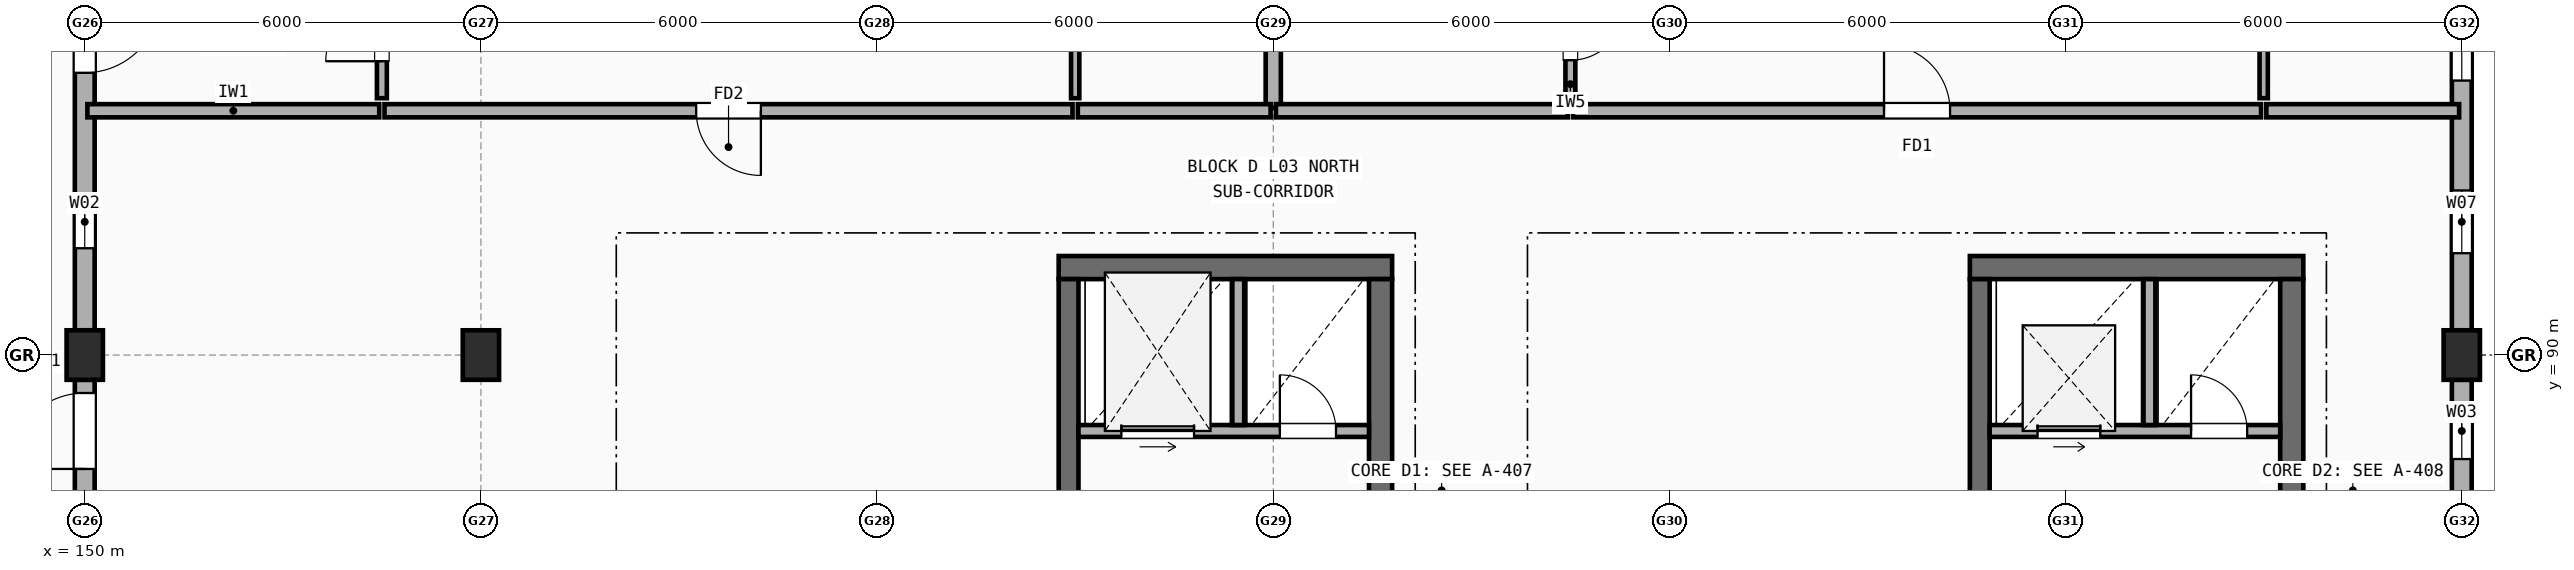
"""IFC4 building model, lengths in metres.
Left out: names, types, materials, properties, quantities, classifications, styles, units other than length and angle.
Written with IfcOpenShell. Run it as: python <this file> out.ifc"""

import sys

from ifc_helpers import new_model, si_unit, direction, frame, frame_2d, origin, origin_2d, place, context, subcontext, project, spatial, rectangle, extrude, element, fill, save


model = new_model("IFC4")
c1 = context("Model", 3, precision=1e-05, world=origin(), true_north=direction((0.0, 1.0)))
c2 = subcontext(c1, "Body", "Model", "MODEL_VIEW")
j1 = project(units=[si_unit("LENGTHUNIT", "METRE"), si_unit("PLANEANGLEUNIT", "RADIAN")], contexts=[c1])
p1 = place(None, origin())
s1 = spatial("IfcSite", under=j1, at=p1, CompositionType="ELEMENT")
p2 = place(p1, origin())
s2 = spatial("IfcBuilding", under=s1, at=p2, CompositionType="ELEMENT")
p3 = place(p2, frame((0.0, 0.0, 10.9)))
s3 = spatial("IfcBuildingStorey", under=s2, at=p3, CompositionType="ELEMENT", Elevation=10.9)
for number, where, z_axis, x_axis in (
    (1, (150.0, 90.0, 0.0), (0.0, 0.0, 1.0), (1.0, 0.0, 0.0)),
    (2, (156.0, 90.0, 0.0), (0.0, 0.0, 1.0), (1.0, 0.0, 0.0)),
    (3, (186.0, 90.0, 0.0), (0.0, 0.0, 1.0), (1.0, 0.0, 0.0)),
):
    element("IfcColumn", number, at=place(p3, frame(where, z_axis=z_axis, x_axis=x_axis)), inside=s3, PredefinedType="COLUMN", context=c2, shape_type="SweptSolid", body=[
        extrude(rectangle(XDim=0.55, YDim=0.75, at=origin_2d()), origin(), (0.0, 0.0, 1.0), 2.96),
    ])
p4 = place(p3, frame((186.0, 84.375, 0.0), z_axis=(0.0, 0.0, 1.0), x_axis=(0.0, 1.0, 0.0)))
e4 = element("IfcWall", 4, at=p4, inside=s3, PredefinedType="STANDARD", context=c2, shape_type="SweptSolid", body=[
    extrude(rectangle(XDim=5.25, YDim=0.3, at=frame_2d((2.625, 0.0))), origin(), (0.0, 0.0, 1.0), 2.442),
])
p5 = place(p4, frame((0.35, 0.0, 0.9)))
e5 = element("IfcOpeningElement", 5, at=p5, cuts=e4, PredefinedType="OPENING", context=c2, shape_type="SweptSolid", body=[
    extrude(rectangle(XDim=0.85, YDim=1.25, at=frame_2d((0.425, 0.625))), frame((0.0, 0.16, 0.0), z_axis=(0.0, -1.0, 0.0), x_axis=(1.0, 0.0, 0.0)), (0.0, 0.0, 1.0), 0.32),
])
p6 = place(p4, frame((4.05, 0.0, 0.9)))
e6 = element("IfcOpeningElement", 6, at=p6, cuts=e4, PredefinedType="OPENING", context=c2, shape_type="SweptSolid", body=[
    extrude(rectangle(XDim=0.85, YDim=1.25, at=frame_2d((0.425, 0.625))), frame((0.0, 0.16, 0.0), z_axis=(0.0, -1.0, 0.0), x_axis=(1.0, 0.0, 0.0)), (0.0, 0.0, 1.0), 0.32),
])
p7 = place(p3, frame((186.0, 90.375, 0.0), z_axis=(0.0, 0.0, 1.0), x_axis=(0.0, 1.0, 0.0)))
e7 = element("IfcWall", 7, at=p7, inside=s3, PredefinedType="STANDARD", context=c2, shape_type="SweptSolid", body=[
    extrude(rectangle(XDim=5.25, YDim=0.3, at=frame_2d((2.625, 0.0))), origin(), (0.0, 0.0, 1.0), 2.442),
])
p8 = place(p7, frame((1.167, 0.0, 0.9)))
e8 = element("IfcOpeningElement", 8, at=p8, cuts=e7, PredefinedType="OPENING", context=c2, shape_type="SweptSolid", body=[
    extrude(rectangle(XDim=0.95, YDim=1.35, at=frame_2d((0.475, 0.675))), frame((0.0, 0.16, 0.0), z_axis=(0.0, -1.0, 0.0), x_axis=(1.0, 0.0, 0.0)), (0.0, 0.0, 1.0), 0.32),
])
p9 = place(p7, frame((3.782, 0.0, 0.9)))
e9 = element("IfcOpeningElement", 9, at=p9, cuts=e7, PredefinedType="OPENING", context=c2, shape_type="SweptSolid", body=[
    extrude(rectangle(XDim=1.05, YDim=1.35, at=frame_2d((0.525, 0.675))), frame((0.0, 0.16, 0.0), z_axis=(0.0, -1.0, 0.0), x_axis=(1.0, 0.0, 0.0)), (0.0, 0.0, 1.0), 0.32),
])
p10 = place(p3, frame((150.0, 95.625, 0.0), z_axis=(0.0, 0.0, 1.0), x_axis=(0.0, -1.0, 0.0)))
e10 = element("IfcWall", 10, at=p10, inside=s3, PredefinedType="STANDARD", context=c2, shape_type="SweptSolid", body=[
    extrude(rectangle(XDim=5.25, YDim=0.3, at=frame_2d((2.625, 0.0))), origin(), (0.0, 0.0, 1.0), 2.442),
])
p11 = place(p10, frame((0.2, 0.0, 0.0)))
e11 = element("IfcOpeningElement", 11, at=p11, cuts=e10, PredefinedType="OPENING", context=c2, shape_type="SweptSolid", body=[
    extrude(rectangle(XDim=1.15, YDim=2.15, at=frame_2d((0.575, 1.075))), frame((0.0, 0.16, 0.0), z_axis=(0.0, -1.0, 0.0), x_axis=(1.0, 0.0, 0.0)), (0.0, 0.0, 1.0), 0.32),
])
p12 = place(p10, frame((3.208, 0.0, 0.9)))
e12 = element("IfcOpeningElement", 12, at=p12, cuts=e10, PredefinedType="OPENING", context=c2, shape_type="SweptSolid", body=[
    extrude(rectangle(XDim=0.8, YDim=1.2, at=frame_2d((0.4, 0.6))), frame((0.0, 0.16, 0.0), z_axis=(0.0, -1.0, 0.0), x_axis=(1.0, 0.0, 0.0)), (0.0, 0.0, 1.0), 0.32),
])
p13 = place(p3, frame((150.0, 89.625, 0.0), z_axis=(0.0, 0.0, 1.0), x_axis=(0.0, -1.0, 0.0)))
e13 = element("IfcWall", 13, at=p13, inside=s3, PredefinedType="STANDARD", context=c2, shape_type="SweptSolid", body=[
    extrude(rectangle(XDim=5.25, YDim=0.3, at=frame_2d((2.625, 0.0))), origin(), (0.0, 0.0, 1.0), 2.442),
])
p14 = place(p13, frame((0.2, 0.0, 0.0)))
e14 = element("IfcOpeningElement", 14, at=p14, cuts=e13, PredefinedType="OPENING", context=c2, shape_type="SweptSolid", body=[
    extrude(rectangle(XDim=1.15, YDim=2.15, at=frame_2d((0.575, 1.075))), frame((0.0, 0.16, 0.0), z_axis=(0.0, -1.0, 0.0), x_axis=(1.0, 0.0, 0.0)), (0.0, 0.0, 1.0), 0.32),
])
p15 = place(p3, frame((169.8, 91.325, 0.0), z_axis=(0.0, 0.0, 1.0), x_axis=(-1.0, 0.0, 0.0)))
e15 = element("IfcWall", 15, at=p15, inside=s3, PredefinedType="SHEAR", context=c2, shape_type="SweptSolid", body=[
    extrude(rectangle(XDim=5.05, YDim=0.35, at=frame_2d((2.525, 0.0))), origin(), (0.0, 0.0, 1.0), 2.96),
])
p16 = place(p3, frame((169.625, 84.75, 0.0), z_axis=(0.0, 0.0, 1.0), x_axis=(0.0, 1.0, 0.0)))
e16 = element("IfcWall", 16, at=p16, inside=s3, PredefinedType="SHEAR", context=c2, shape_type="SweptSolid", body=[
    extrude(rectangle(XDim=6.4, YDim=0.35, at=frame_2d((3.2, 0.0))), origin(), (0.0, 0.0, 1.0), 2.96),
])
p17 = place(p3, frame((164.9, 87.8, 0.0), z_axis=(0.0, 0.0, 1.0), x_axis=(0.0, 1.0, 0.0)))
e17 = element("IfcWall", 17, at=p17, inside=s3, PredefinedType="SHEAR", context=c2, shape_type="SweptSolid", body=[
    extrude(rectangle(XDim=3.35, YDim=0.3, at=frame_2d((1.675, 0.0))), origin(), (0.0, 0.0, 1.0), 2.96),
])
p18 = place(p3, frame((165.05, 88.85, 0.0), z_axis=(0.0, 0.0, 1.0), x_axis=(1.0, 0.0, 0.0)))
e18 = element("IfcWall", 18, at=p18, inside=s3, PredefinedType="SOLIDWALL", context=c2, shape_type="SweptSolid", body=[
    extrude(rectangle(XDim=4.4, YDim=0.18, at=frame_2d((2.2, 0.0))), origin(), (0.0, 0.0, 1.0), 2.96),
])
p19 = place(p18, frame((0.65, 0.0, 0.0)))
e19 = element("IfcOpeningElement", 19, at=p19, cuts=e18, PredefinedType="OPENING", context=c2, shape_type="SweptSolid", body=[
    extrude(rectangle(XDim=1.1, YDim=2.15, at=frame_2d((0.55, 1.075))), frame((0.0, 0.1, 0.0), z_axis=(0.0, -1.0, 0.0), x_axis=(1.0, 0.0, 0.0)), (0.0, 0.0, 1.0), 0.2),
])
p20 = place(p18, frame((3.05, 0.0, 0.0)))
e20 = element("IfcOpeningElement", 20, at=p20, cuts=e18, PredefinedType="OPENING", context=c2, shape_type="SweptSolid", body=[
    extrude(rectangle(XDim=0.85, YDim=2.1, at=frame_2d((0.425, 1.05))), frame((0.0, 0.1, 0.0), z_axis=(0.0, -1.0, 0.0), x_axis=(1.0, 0.0, 0.0)), (0.0, 0.0, 1.0), 0.2),
])
p21 = place(p3, frame((167.47, 88.94, 0.0), z_axis=(0.0, 0.0, 1.0), x_axis=(0.0, 1.0, 0.0)))
e21 = element("IfcWall", 21, at=p21, inside=s3, PredefinedType="SOLIDWALL", context=c2, shape_type="SweptSolid", body=[
    extrude(rectangle(XDim=2.21, YDim=0.18, at=frame_2d((1.105, 0.0))), origin(), (0.0, 0.0, 1.0), 2.96),
])
p22 = place(p3, frame((183.6, 91.325, 0.0), z_axis=(0.0, 0.0, 1.0), x_axis=(-1.0, 0.0, 0.0)))
e22 = element("IfcWall", 22, at=p22, inside=s3, PredefinedType="SHEAR", context=c2, shape_type="SweptSolid", body=[
    extrude(rectangle(XDim=5.05, YDim=0.35, at=frame_2d((2.525, 0.0))), origin(), (0.0, 0.0, 1.0), 2.96),
])
p23 = place(p3, frame((183.425, 84.75, 0.0), z_axis=(0.0, 0.0, 1.0), x_axis=(0.0, 1.0, 0.0)))
e23 = element("IfcWall", 23, at=p23, inside=s3, PredefinedType="SHEAR", context=c2, shape_type="SweptSolid", body=[
    extrude(rectangle(XDim=6.4, YDim=0.35, at=frame_2d((3.2, 0.0))), origin(), (0.0, 0.0, 1.0), 2.96),
])
p24 = place(p3, frame((178.7, 87.7, 0.0), z_axis=(0.0, 0.0, 1.0), x_axis=(0.0, 1.0, 0.0)))
e24 = element("IfcWall", 24, at=p24, inside=s3, PredefinedType="SHEAR", context=c2, shape_type="SweptSolid", body=[
    extrude(rectangle(XDim=3.45, YDim=0.3, at=frame_2d((1.725, 0.0))), origin(), (0.0, 0.0, 1.0), 2.96),
])
p25 = place(p3, frame((178.85, 88.85, 0.0), z_axis=(0.0, 0.0, 1.0), x_axis=(1.0, 0.0, 0.0)))
e25 = element("IfcWall", 25, at=p25, inside=s3, PredefinedType="SOLIDWALL", context=c2, shape_type="SweptSolid", body=[
    extrude(rectangle(XDim=4.4, YDim=0.18, at=frame_2d((2.2, 0.0))), origin(), (0.0, 0.0, 1.0), 2.96),
])
p26 = place(p25, frame((0.725, 0.0, 0.0)))
e26 = element("IfcOpeningElement", 26, at=p26, cuts=e25, PredefinedType="OPENING", context=c2, shape_type="SweptSolid", body=[
    extrude(rectangle(XDim=0.95, YDim=2.15, at=frame_2d((0.475, 1.075))), frame((0.0, 0.1, 0.0), z_axis=(0.0, -1.0, 0.0), x_axis=(1.0, 0.0, 0.0)), (0.0, 0.0, 1.0), 0.2),
])
p27 = place(p25, frame((3.05, 0.0, 0.0)))
e27 = element("IfcOpeningElement", 27, at=p27, cuts=e25, PredefinedType="OPENING", context=c2, shape_type="SweptSolid", body=[
    extrude(rectangle(XDim=0.85, YDim=2.1, at=frame_2d((0.425, 1.05))), frame((0.0, 0.1, 0.0), z_axis=(0.0, -1.0, 0.0), x_axis=(1.0, 0.0, 0.0)), (0.0, 0.0, 1.0), 0.2),
])
p28 = place(p3, frame((181.27, 88.94, 0.0), z_axis=(0.0, 0.0, 1.0), x_axis=(0.0, 1.0, 0.0)))
e28 = element("IfcWall", 28, at=p28, inside=s3, PredefinedType="SOLIDWALL", context=c2, shape_type="SweptSolid", body=[
    extrude(rectangle(XDim=2.21, YDim=0.18, at=frame_2d((1.105, 0.0))), origin(), (0.0, 0.0, 1.0), 2.96),
])
p29 = place(p3, frame((168.0, 93.74, 0.0), z_axis=(0.0, 0.0, 1.0), x_axis=(0.0, 1.0, 0.0)))
e29 = element("IfcWall", 29, at=p29, inside=s3, PredefinedType="SOLIDWALL", context=c2, shape_type="SweptSolid", body=[
    extrude(rectangle(XDim=13.87, YDim=0.23, at=frame_2d((6.935, 0.0))), origin(), (0.0, 0.0, 1.0), 2.458),
])
p30 = place(p3, frame((150.04, 93.7, 0.0), z_axis=(0.0, 0.0, 1.0), x_axis=(1.0, 0.0, 0.0)))
e30 = element("IfcWall", 30, at=p30, inside=s3, PredefinedType="SOLIDWALL", context=c2, shape_type="SweptSolid", body=[
    extrude(rectangle(XDim=4.42, YDim=0.2, at=frame_2d((2.21, 0.0))), origin(), (0.0, 0.0, 1.0), 2.442),
])
p31 = place(p3, frame((154.54, 93.7, 0.0), z_axis=(0.0, 0.0, 1.0), x_axis=(1.0, 0.0, 0.0)))
e31 = element("IfcWall", 31, at=p31, inside=s3, PredefinedType="SOLIDWALL", context=c2, shape_type="SweptSolid", body=[
    extrude(rectangle(XDim=10.42, YDim=0.2, at=frame_2d((5.21, 0.0))), origin(), (0.0, 0.0, 1.0), 2.442),
])
p32 = place(p31, frame((4.72, 0.0, 0.0)))
e32 = element("IfcOpeningElement", 32, at=p32, cuts=e31, PredefinedType="OPENING", context=c2, shape_type="SweptSolid", body=[
    extrude(rectangle(XDim=0.98, YDim=2.15, at=frame_2d((0.49, 1.075))), frame((0.0, 0.11, 0.0), z_axis=(0.0, -1.0, 0.0), x_axis=(1.0, 0.0, 0.0)), (0.0, 0.0, 1.0), 0.22),
])
p33 = place(p3, frame((154.5, 93.89, 0.0), z_axis=(0.0, 0.0, 1.0), x_axis=(0.0, 1.0, 0.0)))
e33 = element("IfcWall", 33, at=p33, inside=s3, PredefinedType="PARTITIONING", context=c2, shape_type="SweptSolid", body=[
    extrude(rectangle(XDim=1.97, YDim=0.15, at=frame_2d((0.985, 0.0))), origin(), (0.0, 0.0, 1.0), 2.96),
])
p34 = place(p33, frame((0.56, 0.0, 0.0)))
e34 = element("IfcOpeningElement", 34, at=p34, cuts=e33, PredefinedType="OPENING", context=c2, shape_type="SweptSolid", body=[
    extrude(rectangle(XDim=0.85, YDim=2.1, at=frame_2d((0.425, 1.05))), frame((0.0, 0.085, 0.0), z_axis=(0.0, -1.0, 0.0), x_axis=(1.0, 0.0, 0.0)), (0.0, 0.0, 1.0), 0.17),
])
p35 = place(p3, frame((165.04, 93.7, 0.0), z_axis=(0.0, 0.0, 1.0), x_axis=(1.0, 0.0, 0.0)))
e35 = element("IfcWall", 35, at=p35, inside=s3, PredefinedType="SOLIDWALL", context=c2, shape_type="SweptSolid", body=[
    extrude(rectangle(XDim=2.92, YDim=0.2, at=frame_2d((1.46, 0.0))), origin(), (0.0, 0.0, 1.0), 2.508),
])
p36 = place(p3, frame((165.0, 93.89, 0.0), z_axis=(0.0, 0.0, 1.0), x_axis=(0.0, 1.0, 0.0)))
e36 = element("IfcWall", 36, at=p36, inside=s3, PredefinedType="PARTITIONING", context=c2, shape_type="SweptSolid", body=[
    extrude(rectangle(XDim=13.92, YDim=0.125, at=frame_2d((6.96, 0.0))), origin(), (0.0, 0.0, 1.0), 2.408),
])
p37 = place(p36, frame((6.65, 0.0, 0.0)))
e37 = element("IfcOpeningElement", 37, at=p37, cuts=e36, PredefinedType="OPENING", context=c2, shape_type="SweptSolid", body=[
    extrude(rectangle(XDim=0.9, YDim=2.1, at=frame_2d((0.45, 1.05))), frame((0.0, 0.073, 0.0), z_axis=(0.0, -1.0, 0.0), x_axis=(1.0, 0.0, 0.0)), (0.0, 0.0, 1.0), 0.145),
])
p38 = place(p3, frame((168.04, 93.7, 0.0), z_axis=(0.0, 0.0, 1.0), x_axis=(1.0, 0.0, 0.0)))
e38 = element("IfcWall", 38, at=p38, inside=s3, PredefinedType="SOLIDWALL", context=c2, shape_type="SweptSolid", body=[
    extrude(rectangle(XDim=4.42, YDim=0.2, at=frame_2d((2.21, 0.0))), origin(), (0.0, 0.0, 1.0), 2.508),
])
p39 = place(p3, frame((172.54, 93.7, 0.0), z_axis=(0.0, 0.0, 1.0), x_axis=(1.0, 0.0, 0.0)))
e39 = element("IfcWall", 39, at=p39, inside=s3, PredefinedType="SOLIDWALL", context=c2, shape_type="SweptSolid", body=[
    extrude(rectangle(XDim=10.42, YDim=0.2, at=frame_2d((5.21, 0.0))), origin(), (0.0, 0.0, 1.0), 2.96),
])
p40 = place(p39, frame((4.71, 0.0, 0.0)))
e40 = element("IfcOpeningElement", 40, at=p40, cuts=e39, PredefinedType="OPENING", context=c2, shape_type="SweptSolid", body=[
    extrude(rectangle(XDim=1.0, YDim=2.15, at=frame_2d((0.5, 1.075))), frame((0.0, 0.11, 0.0), z_axis=(0.0, -1.0, 0.0), x_axis=(1.0, 0.0, 0.0)), (0.0, 0.0, 1.0), 0.22),
])
p41 = place(p3, frame((172.5, 93.89, 0.0), z_axis=(0.0, 0.0, 1.0), x_axis=(0.0, 1.0, 0.0)))
e41 = element("IfcWall", 41, at=p41, inside=s3, PredefinedType="PARTITIONING", context=c2, shape_type="SweptSolid", body=[
    extrude(rectangle(XDim=1.97, YDim=0.15, at=frame_2d((0.985, 0.0))), origin(), (0.0, 0.0, 1.0), 2.96),
])
p42 = place(p41, frame((0.575, 0.0, 0.0)))
e42 = element("IfcOpeningElement", 42, at=p42, cuts=e41, PredefinedType="OPENING", context=c2, shape_type="SweptSolid", body=[
    extrude(rectangle(XDim=0.82, YDim=2.08, at=frame_2d((0.41, 1.04))), frame((0.0, 0.085, 0.0), z_axis=(0.0, -1.0, 0.0), x_axis=(1.0, 0.0, 0.0)), (0.0, 0.0, 1.0), 0.17),
])
p43 = place(p3, frame((183.04, 93.7, 0.0), z_axis=(0.0, 0.0, 1.0), x_axis=(1.0, 0.0, 0.0)))
e43 = element("IfcWall", 43, at=p43, inside=s3, PredefinedType="SOLIDWALL", context=c2, shape_type="SweptSolid", body=[
    extrude(rectangle(XDim=2.92, YDim=0.2, at=frame_2d((1.46, 0.0))), origin(), (0.0, 0.0, 1.0), 2.442),
])
p44 = place(p3, frame((183.0, 93.89, 0.0), z_axis=(0.0, 0.0, 1.0), x_axis=(0.0, 1.0, 0.0)))
e44 = element("IfcWall", 44, at=p44, inside=s3, PredefinedType="PARTITIONING", context=c2, shape_type="SweptSolid", body=[
    extrude(rectangle(XDim=13.92, YDim=0.125, at=frame_2d((6.96, 0.0))), origin(), (0.0, 0.0, 1.0), 2.408),
])
p45 = place(p44, frame((6.65, 0.0, 0.0)))
e45 = element("IfcOpeningElement", 45, at=p45, cuts=e44, PredefinedType="OPENING", context=c2, shape_type="SweptSolid", body=[
    extrude(rectangle(XDim=0.88, YDim=2.1, at=frame_2d((0.44, 1.05))), frame((0.0, 0.073, 0.0), z_axis=(0.0, -1.0, 0.0), x_axis=(1.0, 0.0, 0.0)), (0.0, 0.0, 1.0), 0.145),
])
p46 = place(p6, origin())
e46 = element("IfcWindow", 46, at=p46, inside=s3, PartitioningType="SINGLE_PANEL", PredefinedType="WINDOW", context=c2, shape_type="SweptSolid", body=[
    extrude(rectangle(XDim=0.85, YDim=1.25, at=frame_2d((0.425, 0.625))), frame((0.0, 0.03, 0.0), z_axis=(0.0, -1.0, 0.0), x_axis=(1.0, 0.0, 0.0)), (0.0, 0.0, 1.0), 0.06),
])
fill(e6, e46)
p47 = place(p8, origin())
e47 = element("IfcWindow", 47, at=p47, inside=s3, PartitioningType="SINGLE_PANEL", PredefinedType="WINDOW", context=c2, shape_type="SweptSolid", body=[
    extrude(rectangle(XDim=0.95, YDim=1.35, at=frame_2d((0.475, 0.675))), frame((0.0, 0.03, 0.0), z_axis=(0.0, -1.0, 0.0), x_axis=(1.0, 0.0, 0.0)), (0.0, 0.0, 1.0), 0.06),
])
fill(e8, e47)
p48 = place(p9, origin())
e48 = element("IfcWindow", 48, at=p48, inside=s3, PartitioningType="SINGLE_PANEL", PredefinedType="WINDOW", context=c2, shape_type="SweptSolid", body=[
    extrude(rectangle(XDim=1.05, YDim=1.35, at=frame_2d((0.525, 0.675))), frame((0.0, 0.03, 0.0), z_axis=(0.0, -1.0, 0.0), x_axis=(1.0, 0.0, 0.0)), (0.0, 0.0, 1.0), 0.06),
])
fill(e9, e48)
p49 = place(p11, frame((1.15, 0.0, 0.0), z_axis=(0.0, 0.0, 1.0), x_axis=(-1.0, 0.0, 0.0)))
e49 = element("IfcDoor", 49, at=p49, inside=s3, OperationType="SINGLE_SWING_LEFT", PredefinedType="DOOR", context=c2, shape_type="SweptSolid", body=[
    extrude(rectangle(XDim=1.15, YDim=2.15, at=frame_2d((0.575, 1.075))), frame((0.0, 0.025, 0.0), z_axis=(0.0, -1.0, 0.0), x_axis=(1.0, 0.0, 0.0)), (0.0, 0.0, 1.0), 0.05),
])
fill(e11, e49)
p50 = place(p12, origin())
e50 = element("IfcWindow", 50, at=p50, inside=s3, PartitioningType="SINGLE_PANEL", PredefinedType="WINDOW", context=c2, shape_type="SweptSolid", body=[
    extrude(rectangle(XDim=0.8, YDim=1.2, at=frame_2d((0.4, 0.6))), frame((0.0, 0.03, 0.0), z_axis=(0.0, -1.0, 0.0), x_axis=(1.0, 0.0, 0.0)), (0.0, 0.0, 1.0), 0.06),
])
fill(e12, e50)
p51 = place(p14, frame((1.15, 0.0, 0.0), z_axis=(0.0, 0.0, 1.0), x_axis=(-1.0, 0.0, 0.0)))
e51 = element("IfcDoor", 51, at=p51, inside=s3, OperationType="SINGLE_SWING_RIGHT", PredefinedType="DOOR", context=c2, shape_type="SweptSolid", body=[
    extrude(rectangle(XDim=1.15, YDim=2.15, at=frame_2d((0.575, 1.075))), frame((0.0, 0.025, 0.0), z_axis=(0.0, -1.0, 0.0), x_axis=(1.0, 0.0, 0.0)), (0.0, 0.0, 1.0), 0.05),
])
fill(e14, e51)
p52 = place(p19, origin())
e52 = element("IfcDoor", 52, at=p52, inside=s3, OperationType="SLIDING_TO_LEFT", PredefinedType="DOOR", context=c2, shape_type="SweptSolid", body=[
    extrude(rectangle(XDim=1.1, YDim=2.15, at=frame_2d((0.55, 1.075))), frame((0.0, 0.025, 0.0), z_axis=(0.0, -1.0, 0.0), x_axis=(1.0, 0.0, 0.0)), (0.0, 0.0, 1.0), 0.05),
])
fill(e19, e52)
p53 = place(p20, frame((0.85, 0.0, 0.0), z_axis=(0.0, 0.0, 1.0), x_axis=(-1.0, 0.0, 0.0)))
e53 = element("IfcDoor", 53, at=p53, inside=s3, OperationType="SINGLE_SWING_LEFT", PredefinedType="DOOR", context=c2, shape_type="SweptSolid", body=[
    extrude(rectangle(XDim=0.85, YDim=2.1, at=frame_2d((0.425, 1.05))), frame((0.0, 0.025, 0.0), z_axis=(0.0, -1.0, 0.0), x_axis=(1.0, 0.0, 0.0)), (0.0, 0.0, 1.0), 0.05),
])
fill(e20, e53)
p54 = place(p26, origin())
e54 = element("IfcDoor", 54, at=p54, inside=s3, OperationType="SLIDING_TO_LEFT", PredefinedType="DOOR", context=c2, shape_type="SweptSolid", body=[
    extrude(rectangle(XDim=0.95, YDim=2.15, at=frame_2d((0.475, 1.075))), frame((0.0, 0.025, 0.0), z_axis=(0.0, -1.0, 0.0), x_axis=(1.0, 0.0, 0.0)), (0.0, 0.0, 1.0), 0.05),
])
fill(e26, e54)
p55 = place(p27, frame((0.85, 0.0, 0.0), z_axis=(0.0, 0.0, 1.0), x_axis=(-1.0, 0.0, 0.0)))
e55 = element("IfcDoor", 55, at=p55, inside=s3, OperationType="SINGLE_SWING_LEFT", PredefinedType="DOOR", context=c2, shape_type="SweptSolid", body=[
    extrude(rectangle(XDim=0.85, YDim=2.1, at=frame_2d((0.425, 1.05))), frame((0.0, 0.025, 0.0), z_axis=(0.0, -1.0, 0.0), x_axis=(1.0, 0.0, 0.0)), (0.0, 0.0, 1.0), 0.05),
])
fill(e27, e55)
p56 = place(p32, origin())
e56 = element("IfcDoor", 56, at=p56, inside=s3, OperationType="SINGLE_SWING_RIGHT", PredefinedType="DOOR", context=c2, shape_type="SweptSolid", body=[
    extrude(rectangle(XDim=0.98, YDim=2.15, at=frame_2d((0.49, 1.075))), frame((0.0, 0.025, 0.0), z_axis=(0.0, -1.0, 0.0), x_axis=(1.0, 0.0, 0.0)), (0.0, 0.0, 1.0), 0.05),
])
fill(e32, e56)
p57 = place(p34, origin())
e57 = element("IfcDoor", 57, at=p57, inside=s3, OperationType="SINGLE_SWING_LEFT", PredefinedType="DOOR", context=c2, shape_type="SweptSolid", body=[
    extrude(rectangle(XDim=0.85, YDim=2.1, at=frame_2d((0.425, 1.05))), frame((0.0, 0.025, 0.0), z_axis=(0.0, -1.0, 0.0), x_axis=(1.0, 0.0, 0.0)), (0.0, 0.0, 1.0), 0.05),
])
fill(e34, e57)
p58 = place(p40, origin())
e58 = element("IfcDoor", 58, at=p58, inside=s3, OperationType="SINGLE_SWING_LEFT", PredefinedType="DOOR", context=c2, shape_type="SweptSolid", body=[
    extrude(rectangle(XDim=1.0, YDim=2.15, at=frame_2d((0.5, 1.075))), frame((0.0, 0.025, 0.0), z_axis=(0.0, -1.0, 0.0), x_axis=(1.0, 0.0, 0.0)), (0.0, 0.0, 1.0), 0.05),
])
fill(e40, e58)
p59 = place(p42, origin())
e59 = element("IfcDoor", 59, at=p59, inside=s3, OperationType="SINGLE_SWING_RIGHT", PredefinedType="DOOR", context=c2, shape_type="SweptSolid", body=[
    extrude(rectangle(XDim=0.82, YDim=2.08, at=frame_2d((0.41, 1.04))), frame((0.0, 0.025, 0.0), z_axis=(0.0, -1.0, 0.0), x_axis=(1.0, 0.0, 0.0)), (0.0, 0.0, 1.0), 0.05),
])
fill(e42, e59)
save(model, sys.argv[1])
